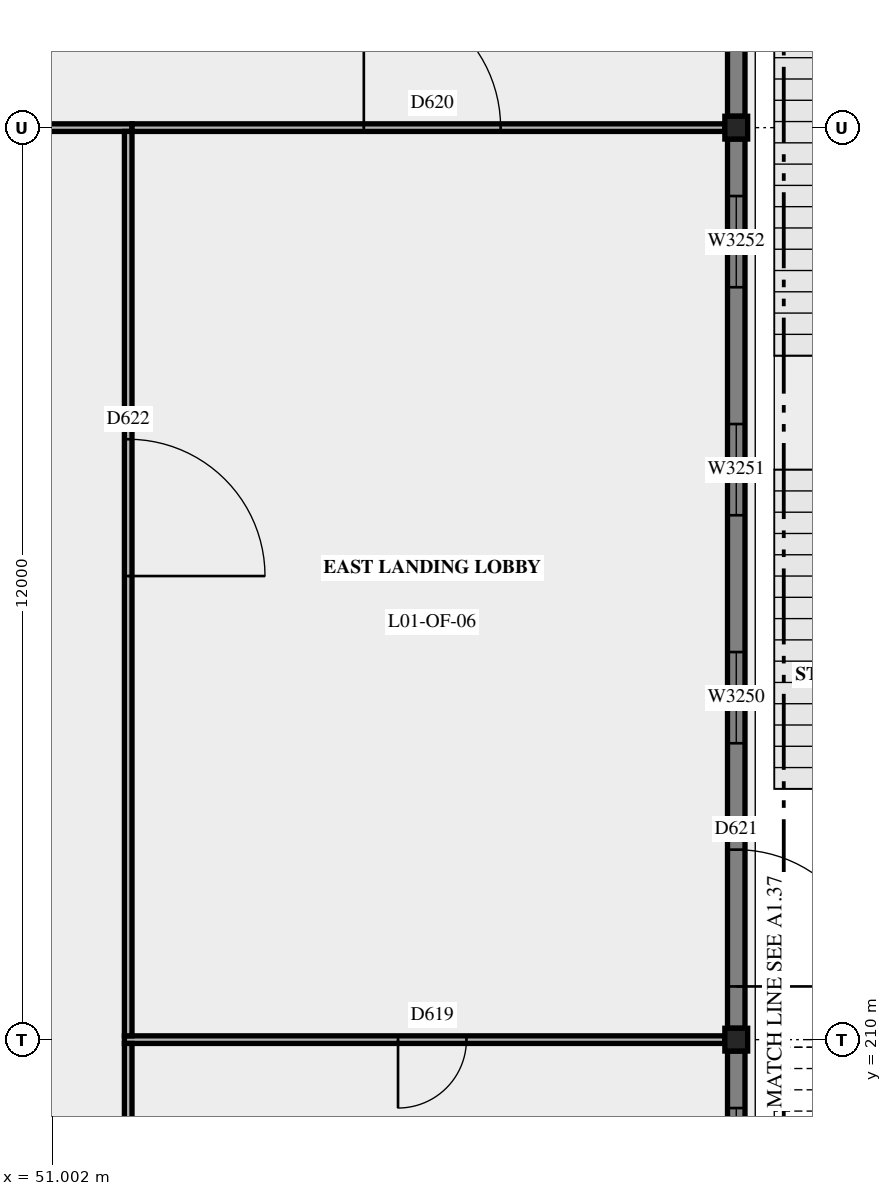
"""IFC4 building model, lengths in metres.
Left out: names, types, materials, properties, quantities, classifications, styles, units other than length and angle.
Written with IfcOpenShell. Run it as: python <this file> out.ifc"""

import sys

from ifc_helpers import new_model, si_unit, direction, frame, frame_2d, origin, origin_2d, place, context, subcontext, project, spatial, rectangle, i_section, extrude, element, fill, save


model = new_model("IFC4")
c1 = context("Model", 3, precision=1e-05, world=origin(), true_north=direction((0.0, 1.0)))
c2 = subcontext(c1, "Body", "Model", "MODEL_VIEW")
j1 = project(units=[si_unit("LENGTHUNIT", "METRE"), si_unit("PLANEANGLEUNIT", "RADIAN")], contexts=[c1])
p1 = place(None, origin())
s1 = spatial("IfcSite", under=j1, at=p1, CompositionType="ELEMENT")
p2 = place(p1, origin())
s2 = spatial("IfcBuilding", under=s1, at=p2, CompositionType="ELEMENT")
p3 = place(p2, frame((0.0, 0.0, 5.4)))
s3 = spatial("IfcBuildingStorey", under=s2, at=p3, CompositionType="ELEMENT", Elevation=5.4)
for number, where, z_axis, x_axis in (
    (1, (60.0, 210.0, 0.0), (0.0, 0.0, 1.0), (1.0, 0.0, 0.0)),
    (2, (60.0, 222.0, 0.0), (0.0, 0.0, 1.0), (1.0, 0.0, 0.0)),
):
    element("IfcColumn", number, at=place(p3, frame(where, z_axis=z_axis, x_axis=x_axis)), inside=s3, PredefinedType="COLUMN", context=c2, shape_type="SweptSolid", body=[
        extrude(i_section(OverallWidth=0.3, OverallDepth=0.3, WebThickness=0.011, FlangeThickness=0.019, at=origin_2d()), origin(), (0.0, 0.0, 1.0), 5.4),
    ])
p4 = place(p3, frame((60.0, 204.5, 0.0), z_axis=(0.0, 0.0, 1.0), x_axis=(0.0, 1.0, 0.0)))
e3 = element("IfcWall", 3, at=p4, inside=s3, PredefinedType="SOLIDWALL", context=c2, shape_type="SweptSolid", body=[
    extrude(rectangle(XDim=5.35, YDim=0.23, at=frame_2d((2.675, 0.0))), origin(), (0.0, 0.0, 1.0), 4.7),
])
p5 = place(p4, frame((0.4, 0.0, 0.9)))
e4 = element("IfcOpeningElement", 4, at=p5, cuts=e3, PredefinedType="OPENING", context=c2, shape_type="SweptSolid", body=[
    extrude(rectangle(XDim=1.2, YDim=3.3, at=frame_2d((0.6, 1.65))), frame((0.0, 0.125, 0.0), z_axis=(0.0, -1.0, 0.0), x_axis=(1.0, 0.0, 0.0)), (0.0, 0.0, 1.0), 0.25),
])
p6 = place(p4, frame((3.4, 0.0, 0.9)))
e5 = element("IfcOpeningElement", 5, at=p6, cuts=e3, PredefinedType="OPENING", context=c2, shape_type="SweptSolid", body=[
    extrude(rectangle(XDim=1.2, YDim=3.3, at=frame_2d((0.6, 1.65))), frame((0.0, 0.125, 0.0), z_axis=(0.0, -1.0, 0.0), x_axis=(1.0, 0.0, 0.0)), (0.0, 0.0, 1.0), 0.25),
])
p7 = place(p3, frame((60.0, 210.15, 0.0), z_axis=(0.0, 0.0, 1.0), x_axis=(0.0, 1.0, 0.0)))
e6 = element("IfcWall", 6, at=p7, inside=s3, PredefinedType="SOLIDWALL", context=c2, shape_type="SweptSolid", body=[
    extrude(rectangle(XDim=11.7, YDim=0.23, at=frame_2d((5.85, 0.0))), origin(), (0.0, 0.0, 1.0), 4.7),
])
p8 = place(p7, frame((2.35, 0.0, 0.0), z_axis=(0.0, 0.0, 1.0), x_axis=(-1.0, 0.0, 0.0)))
e7 = element("IfcOpeningElement", 7, at=p8, cuts=e6, PredefinedType="OPENING", context=c2, shape_type="SweptSolid", body=[
    extrude(rectangle(XDim=1.8, YDim=2.1, at=frame_2d((0.9, 1.05))), frame((0.0, 0.125, 0.0), z_axis=(0.0, -1.0, 0.0), x_axis=(1.0, 0.0, 0.0)), (0.0, 0.0, 1.0), 0.25),
])
p9 = place(p7, frame((3.75, 0.0, 0.9)))
e8 = element("IfcOpeningElement", 8, at=p9, cuts=e6, PredefinedType="OPENING", context=c2, shape_type="SweptSolid", body=[
    extrude(rectangle(XDim=1.2, YDim=3.3, at=frame_2d((0.6, 1.65))), frame((0.0, 0.125, 0.0), z_axis=(0.0, -1.0, 0.0), x_axis=(1.0, 0.0, 0.0)), (0.0, 0.0, 1.0), 0.25),
])
p10 = place(p7, frame((6.75, 0.0, 0.9)))
e9 = element("IfcOpeningElement", 9, at=p10, cuts=e6, PredefinedType="OPENING", context=c2, shape_type="SweptSolid", body=[
    extrude(rectangle(XDim=1.2, YDim=3.3, at=frame_2d((0.6, 1.65))), frame((0.0, 0.125, 0.0), z_axis=(0.0, -1.0, 0.0), x_axis=(1.0, 0.0, 0.0)), (0.0, 0.0, 1.0), 0.25),
])
p11 = place(p7, frame((9.75, 0.0, 0.9)))
e10 = element("IfcOpeningElement", 10, at=p11, cuts=e6, PredefinedType="OPENING", context=c2, shape_type="SweptSolid", body=[
    extrude(rectangle(XDim=1.2, YDim=3.3, at=frame_2d((0.6, 1.65))), frame((0.0, 0.125, 0.0), z_axis=(0.0, -1.0, 0.0), x_axis=(1.0, 0.0, 0.0)), (0.0, 0.0, 1.0), 0.25),
])
p12 = place(p3, frame((60.0, 222.15, 0.0), z_axis=(0.0, 0.0, 1.0), x_axis=(0.0, 1.0, 0.0)))
e11 = element("IfcWall", 11, at=p12, inside=s3, PredefinedType="SOLIDWALL", context=c2, shape_type="SweptSolid", body=[
    extrude(rectangle(XDim=3.85, YDim=0.23, at=frame_2d((1.925, 0.0))), origin(), (0.0, 0.0, 1.0), 4.7),
])
p13 = place(p3, frame((51.95, 210.0, 0.0), z_axis=(0.0, 0.0, 1.0), x_axis=(1.0, 0.0, 0.0)))
e12 = element("IfcWall", 12, at=p13, inside=s3, PredefinedType="PARTITIONING", context=c2, shape_type="SweptSolid", body=[
    extrude(rectangle(XDim=7.9, YDim=0.1, at=frame_2d((3.95, 0.0))), origin(), (0.0, 0.0, 1.0), 4.65),
])
p14 = place(p13, frame((3.6, 0.0, 0.0)))
e13 = element("IfcOpeningElement", 13, at=p14, cuts=e12, PredefinedType="OPENING", context=c2, shape_type="SweptSolid", body=[
    extrude(rectangle(XDim=0.9, YDim=2.1, at=frame_2d((0.45, 1.05))), frame((0.0, 0.06, 0.0), z_axis=(0.0, -1.0, 0.0), x_axis=(1.0, 0.0, 0.0)), (0.0, 0.0, 1.0), 0.12),
])
p15 = place(p3, frame((48.15, 222.0, 0.0), z_axis=(0.0, 0.0, 1.0), x_axis=(1.0, 0.0, 0.0)))
e14 = element("IfcWall", 14, at=p15, inside=s3, PredefinedType="PARTITIONING", context=c2, shape_type="SweptSolid", body=[
    extrude(rectangle(XDim=3.9, YDim=0.1, at=frame_2d((1.95, 0.0))), origin(), (0.0, 0.0, 1.0), 4.65),
])
p16 = place(p3, frame((52.05, 222.0, 0.0), z_axis=(0.0, 0.0, 1.0), x_axis=(1.0, 0.0, 0.0)))
e15 = element("IfcWall", 15, at=p16, inside=s3, PredefinedType="PARTITIONING", context=c2, shape_type="SweptSolid", body=[
    extrude(rectangle(XDim=7.8, YDim=0.1, at=frame_2d((3.9, 0.0))), origin(), (0.0, 0.0, 1.0), 4.65),
])
p17 = place(p16, frame((3.05, 0.0, 0.0)))
e16 = element("IfcOpeningElement", 16, at=p17, cuts=e15, PredefinedType="OPENING", context=c2, shape_type="SweptSolid", body=[
    extrude(rectangle(XDim=1.8, YDim=2.1, at=frame_2d((0.9, 1.05))), frame((0.0, 0.06, 0.0), z_axis=(0.0, -1.0, 0.0), x_axis=(1.0, 0.0, 0.0)), (0.0, 0.0, 1.0), 0.12),
])
p18 = place(p3, frame((52.0, 204.115, 0.0), z_axis=(0.0, 0.0, 1.0), x_axis=(0.0, 1.0, 0.0)))
e17 = element("IfcWall", 17, at=p18, inside=s3, PredefinedType="PARTITIONING", context=c2, shape_type="SweptSolid", body=[
    extrude(rectangle(XDim=5.835, YDim=0.1, at=frame_2d((2.917, 0.0))), origin(), (0.0, 0.0, 1.0), 4.65),
])
p19 = place(p3, frame((52.0, 210.05, 0.0), z_axis=(0.0, 0.0, 1.0), x_axis=(0.0, 1.0, 0.0)))
e18 = element("IfcWall", 18, at=p19, inside=s3, PredefinedType="PARTITIONING", context=c2, shape_type="SweptSolid", body=[
    extrude(rectangle(XDim=11.9, YDim=0.1, at=frame_2d((5.95, 0.0))), origin(), (0.0, 0.0, 1.0), 4.65),
])
p20 = place(p19, frame((6.05, 0.0, 0.0)))
e19 = element("IfcOpeningElement", 19, at=p20, cuts=e18, PredefinedType="OPENING", context=c2, shape_type="SweptSolid", body=[
    extrude(rectangle(XDim=1.8, YDim=2.1, at=frame_2d((0.9, 1.05))), frame((0.0, 0.06, 0.0), z_axis=(0.0, -1.0, 0.0), x_axis=(1.0, 0.0, 0.0)), (0.0, 0.0, 1.0), 0.12),
])
p21 = place(p8, origin())
e20 = element("IfcDoor", 20, at=p21, inside=s3, OperationType="DOUBLE_DOOR_SINGLE_SWING", PredefinedType="DOOR", context=c2, shape_type="SweptSolid", body=[
    extrude(rectangle(XDim=1.8, YDim=2.1, at=frame_2d((0.9, 1.05))), frame((0.0, 0.025, 0.0), z_axis=(0.0, -1.0, 0.0), x_axis=(1.0, 0.0, 0.0)), (0.0, 0.0, 1.0), 0.05),
])
fill(e7, e20)
p22 = place(p6, origin())
e21 = element("IfcWindow", 21, at=p22, inside=s3, PartitioningType="SINGLE_PANEL", PredefinedType="WINDOW", context=c2, shape_type="SweptSolid", body=[
    extrude(rectangle(XDim=1.2, YDim=3.3, at=frame_2d((0.6, 1.65))), frame((0.0, 0.03, 0.0), z_axis=(0.0, -1.0, 0.0), x_axis=(1.0, 0.0, 0.0)), (0.0, 0.0, 1.0), 0.06),
])
fill(e5, e21)
p23 = place(p9, origin())
e22 = element("IfcWindow", 22, at=p23, inside=s3, PartitioningType="SINGLE_PANEL", PredefinedType="WINDOW", context=c2, shape_type="SweptSolid", body=[
    extrude(rectangle(XDim=1.2, YDim=3.3, at=frame_2d((0.6, 1.65))), frame((0.0, 0.03, 0.0), z_axis=(0.0, -1.0, 0.0), x_axis=(1.0, 0.0, 0.0)), (0.0, 0.0, 1.0), 0.06),
])
fill(e8, e22)
p24 = place(p10, origin())
e23 = element("IfcWindow", 23, at=p24, inside=s3, PartitioningType="SINGLE_PANEL", PredefinedType="WINDOW", context=c2, shape_type="SweptSolid", body=[
    extrude(rectangle(XDim=1.2, YDim=3.3, at=frame_2d((0.6, 1.65))), frame((0.0, 0.03, 0.0), z_axis=(0.0, -1.0, 0.0), x_axis=(1.0, 0.0, 0.0)), (0.0, 0.0, 1.0), 0.06),
])
fill(e9, e23)
p25 = place(p11, origin())
e24 = element("IfcWindow", 24, at=p25, inside=s3, PartitioningType="SINGLE_PANEL", PredefinedType="WINDOW", context=c2, shape_type="SweptSolid", body=[
    extrude(rectangle(XDim=1.2, YDim=3.3, at=frame_2d((0.6, 1.65))), frame((0.0, 0.03, 0.0), z_axis=(0.0, -1.0, 0.0), x_axis=(1.0, 0.0, 0.0)), (0.0, 0.0, 1.0), 0.06),
])
fill(e10, e24)
p26 = place(p14, origin())
e25 = element("IfcDoor", 25, at=p26, inside=s3, OperationType="SINGLE_SWING_RIGHT", PredefinedType="DOOR", context=c2, shape_type="SweptSolid", body=[
    extrude(rectangle(XDim=0.9, YDim=2.1, at=frame_2d((0.45, 1.05))), frame((0.0, 0.025, 0.0), z_axis=(0.0, -1.0, 0.0), x_axis=(1.0, 0.0, 0.0)), (0.0, 0.0, 1.0), 0.05),
])
fill(e13, e25)
p27 = place(p17, origin())
e26 = element("IfcDoor", 26, at=p27, inside=s3, OperationType="DOUBLE_DOOR_SINGLE_SWING", PredefinedType="DOOR", context=c2, shape_type="SweptSolid", body=[
    extrude(rectangle(XDim=1.8, YDim=2.1, at=frame_2d((0.9, 1.05))), frame((0.0, 0.025, 0.0), z_axis=(0.0, -1.0, 0.0), x_axis=(1.0, 0.0, 0.0)), (0.0, 0.0, 1.0), 0.05),
])
fill(e16, e26)
p28 = place(p20, origin())
e27 = element("IfcDoor", 27, at=p28, inside=s3, OperationType="DOUBLE_DOOR_SINGLE_SWING", PredefinedType="DOOR", context=c2, shape_type="SweptSolid", body=[
    extrude(rectangle(XDim=1.8, YDim=2.1, at=frame_2d((0.9, 1.05))), frame((0.0, 0.025, 0.0), z_axis=(0.0, -1.0, 0.0), x_axis=(1.0, 0.0, 0.0)), (0.0, 0.0, 1.0), 0.05),
])
fill(e19, e27)
save(model, sys.argv[1])
